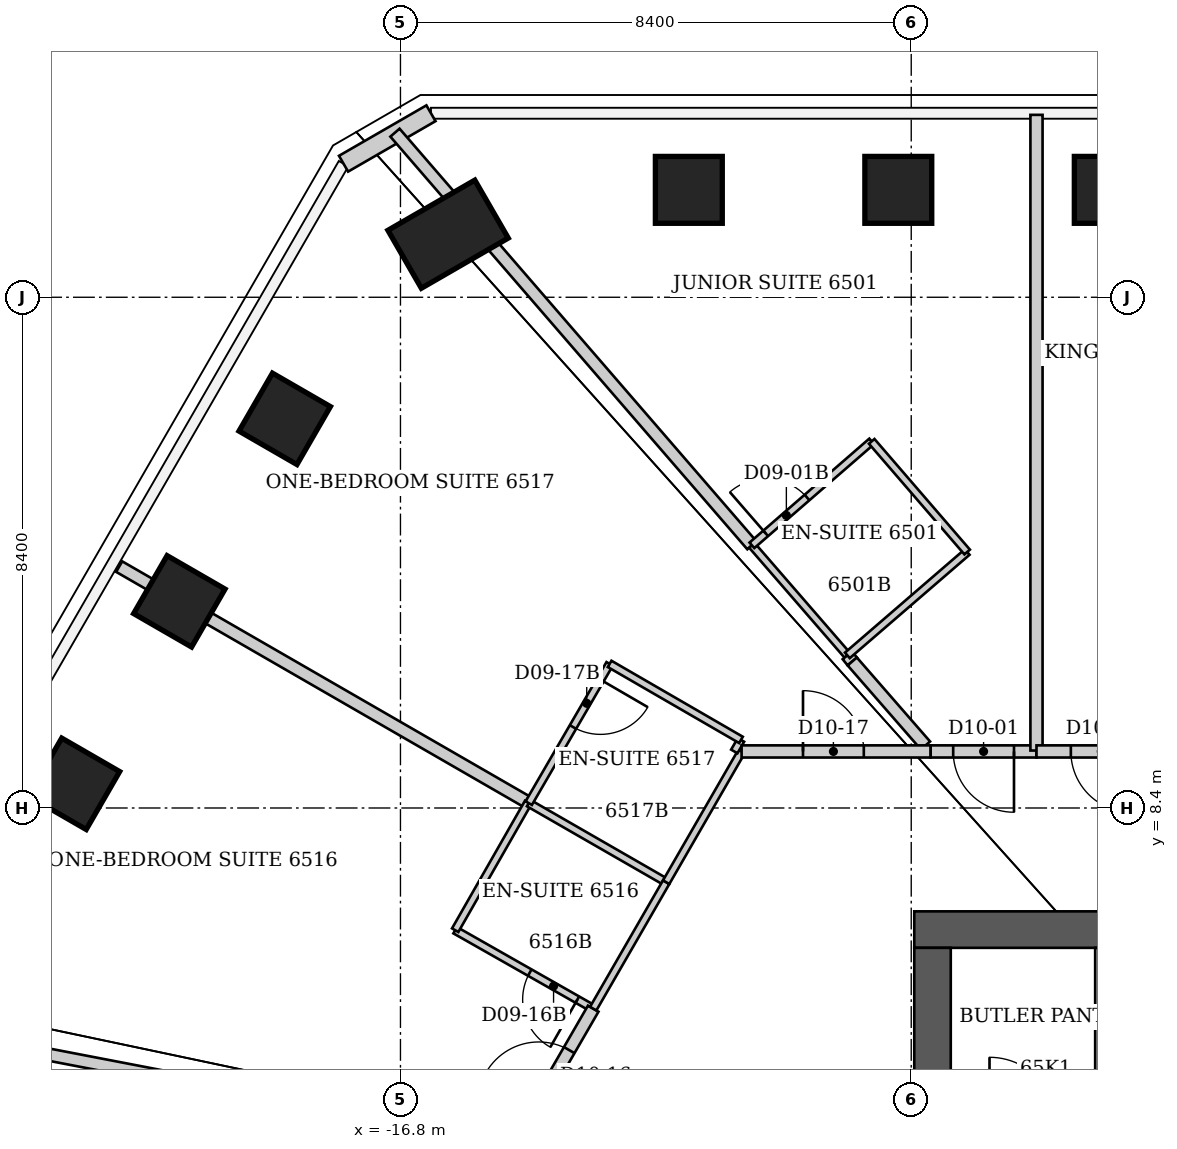
"""IFC4 building model, lengths in metres.
Left out: names, types, materials, properties, quantities, classifications, styles, units other than length and angle.
Written with IfcOpenShell. Run it as: python <this file> out.ifc"""

import sys

from ifc_helpers import new_model, si_unit, direction, frame, frame_2d, origin, origin_2d, place, context, subcontext, project, spatial, rectangle, extrude, element, fill, save


model = new_model("IFC4")
c1 = context("Model", 3, precision=1e-05, world=origin(), true_north=direction((0.0, 1.0)))
c2 = subcontext(c1, "Body", "Model", "MODEL_VIEW")
j1 = project(units=[si_unit("LENGTHUNIT", "METRE"), si_unit("PLANEANGLEUNIT", "RADIAN")], contexts=[c1])
p1 = place(None, origin())
s1 = spatial("IfcSite", under=j1, at=p1, CompositionType="ELEMENT")
p2 = place(p1, origin())
s2 = spatial("IfcBuilding", under=s1, at=p2, CompositionType="ELEMENT")
p3 = place(p2, frame((0.0, 0.0, 260.8)))
s3 = spatial("IfcBuildingStorey", under=s2, at=p3, CompositionType="ELEMENT", Elevation=260.8)
for number, where, z_axis, x_axis in (
    (1, (-12.058, 18.566, 0.0), (0.0, 0.0, 1.0), (0.0, 1.0, 0.0)),
    (2, (-8.613, 18.566, 0.0), (0.0, 0.0, 1.0), (0.0, 1.0, 0.0)),
    (3, (-5.167, 18.566, 0.0), (0.0, 0.0, 1.0), (0.0, 1.0, 0.0)),
    (4, (-22.169, 8.798, 0.0), (0.0, 0.0, 1.0), (-0.866, 0.5, 0.0)),
    (5, (-20.437, 11.799, 0.0), (0.0, 0.0, 1.0), (-0.866, 0.5, 0.0)),
    (6, (-18.704, 14.8, 0.0), (0.0, 0.0, 1.0), (-0.866, 0.5, 0.0)),
):
    element("IfcColumn", number, at=place(p3, frame(where, z_axis=z_axis, x_axis=x_axis)), inside=s3, PredefinedType="COLUMN", context=c2, shape_type="SweptSolid", body=[
        extrude(rectangle(XDim=1.1, YDim=1.1, at=origin_2d()), origin(), (0.0, 0.0, 1.0), 3.8),
    ])
p4 = place(p3, frame((-16.017, 17.837, 0.0), z_axis=(0.0, 0.0, 1.0), x_axis=(-0.5, 0.866025403784, 0.0)))
e7 = element("IfcColumn", 7, at=p4, inside=s3, PredefinedType="COLUMN", context=c2, shape_type="SweptSolid", body=[
    extrude(rectangle(XDim=1.1, YDim=1.65, at=origin_2d()), origin(), (0.0, 0.0, 1.0), 3.8),
])
p5 = place(p3, frame((-8.35, 6.4, 0.0), z_axis=(0.0, 0.0, 1.0), x_axis=(1.0, 0.0, 0.0)))
e8 = element("IfcWall", 8, at=p5, inside=s3, PredefinedType="SHEAR", context=c2, shape_type="SweptSolid", body=[
    extrude(rectangle(XDim=16.7, YDim=0.6, at=frame_2d((8.35, 0.0))), origin(), (0.0, 0.0, 1.0), 3.8),
])
p6 = place(p5, frame((6.488, 0.0, 0.0)))
e9 = element("IfcOpeningElement", 9, at=p6, cuts=e8, PredefinedType="OPENING", context=c2, shape_type="SweptSolid", body=[
    extrude(rectangle(XDim=1.1, YDim=2.1, at=frame_2d((0.55, 1.05))), frame((0.0, 0.3, 0.0), z_axis=(0.0, -1.0, 0.0), x_axis=(1.0, 0.0, 0.0)), (0.0, 0.0, 1.0), 0.6),
])
p7 = place(p5, frame((9.113, 0.0, 0.0)))
e10 = element("IfcOpeningElement", 10, at=p7, cuts=e8, PredefinedType="OPENING", context=c2, shape_type="SweptSolid", body=[
    extrude(rectangle(XDim=1.1, YDim=2.1, at=frame_2d((0.55, 1.05))), frame((0.0, 0.3, 0.0), z_axis=(0.0, -1.0, 0.0), x_axis=(1.0, 0.0, 0.0)), (0.0, 0.0, 1.0), 0.6),
])
p8 = place(p5, frame((11.738, 0.0, 0.0)))
e11 = element("IfcOpeningElement", 11, at=p8, cuts=e8, PredefinedType="OPENING", context=c2, shape_type="SweptSolid", body=[
    extrude(rectangle(XDim=1.1, YDim=2.1, at=frame_2d((0.55, 1.05))), frame((0.0, 0.3, 0.0), z_axis=(0.0, -1.0, 0.0), x_axis=(1.0, 0.0, 0.0)), (0.0, 0.0, 1.0), 0.6),
])
p9 = place(p5, frame((14.363, 0.0, 0.0)))
e12 = element("IfcOpeningElement", 12, at=p9, cuts=e8, PredefinedType="OPENING", context=c2, shape_type="SweptSolid", body=[
    extrude(rectangle(XDim=1.1, YDim=2.1, at=frame_2d((0.55, 1.05))), frame((0.0, 0.3, 0.0), z_axis=(0.0, -1.0, 0.0), x_axis=(1.0, 0.0, 0.0)), (0.0, 0.0, 1.0), 0.6),
])
p10 = place(p3, frame((-8.05, -6.1, 0.0), z_axis=(0.0, 0.0, 1.0), x_axis=(0.0, 1.0, 0.0)))
e13 = element("IfcWall", 13, at=p10, inside=s3, PredefinedType="SHEAR", context=c2, shape_type="SweptSolid", body=[
    extrude(rectangle(XDim=12.2, YDim=0.6, at=frame_2d((6.1, 0.0))), origin(), (0.0, 0.0, 1.0), 3.8),
])
p11 = place(p10, frame((7.6, 0.0, 0.0)))
e14 = element("IfcOpeningElement", 14, at=p11, cuts=e13, PredefinedType="OPENING", context=c2, shape_type="SweptSolid", body=[
    extrude(rectangle(XDim=1.2, YDim=2.2, at=frame_2d((0.6, 1.1))), frame((0.0, 0.3, 0.0), z_axis=(0.0, -1.0, 0.0), x_axis=(1.0, 0.0, 0.0)), (0.0, 0.0, 1.0), 0.6),
])
p12 = place(p3, frame((-5.25, 3.35, 0.0), z_axis=(0.0, 0.0, 1.0), x_axis=(0.0, 1.0, 0.0)))
e15 = element("IfcWall", 15, at=p12, inside=s3, PredefinedType="PARTITIONING", context=c2, shape_type="SweptSolid", body=[
    extrude(rectangle(XDim=2.75, YDim=0.25, at=frame_2d((1.375, 0.0))), origin(), (0.0, 0.0, 1.0), 3.8),
])
p13 = place(p3, frame((-17.736, 18.996, 0.0), z_axis=(0.0, 0.0, 1.0), x_axis=(0.866026405774, 0.499998264499, 0.0)))
e16 = element("IfcWall", 16, at=p13, inside=s3, PredefinedType="SOLIDWALL", context=c2, shape_type="SweptSolid", body=[
    extrude(rectangle(XDim=1.66, YDim=0.3, at=frame_2d((0.83, 0.0))), origin(), (0.0, 0.0, 1.0), 3.64),
])
p14 = place(p3, frame((-25.341, 4.874, 0.0), z_axis=(0.0, 0.0, 1.0), x_axis=(0.982001168061, -0.188874841966, 0.0)))
e17 = element("IfcWall", 17, at=p14, inside=s3, PredefinedType="PARTITIONING", context=c2, shape_type="SweptSolid", body=[
    extrude(rectangle(XDim=10.557, YDim=0.2, at=frame_2d((5.278, 0.0))), origin(), (0.0, 0.0, 1.0), 3.64),
])
p15 = place(p3, frame((-21.426, 12.37, 0.0), z_axis=(0.0, 0.0, 1.0), x_axis=(0.866202335538, -0.499693419917, 0.0)))
e18 = element("IfcWall", 18, at=p15, inside=s3, PredefinedType="PARTITIONING", context=c2, shape_type="SweptSolid", body=[
    extrude(rectangle(XDim=7.765, YDim=0.2, at=frame_2d((3.883, 0.0))), origin(), (0.0, 0.0, 1.0), 2.878),
])
p16 = place(p3, frame((-16.89, 19.507, 0.0), z_axis=(0.0, 0.0, 1.0), x_axis=(0.65416581431, -0.756351166713, 0.0)))
e19 = element("IfcWall", 19, at=p16, inside=s3, PredefinedType="PARTITIONING", context=c2, shape_type="SweptSolid", body=[
    extrude(rectangle(XDim=8.974, YDim=0.2, at=frame_2d((4.487, 0.0))), origin(), (0.0, 0.0, 1.0), 3.64),
])
p17 = place(p3, frame((-15.9, 6.39, 0.0), z_axis=(0.0, 0.0, 1.0), x_axis=(0.869431908012, -0.494052787999, 0.0)))
e20 = element("IfcWall", 20, at=p17, inside=s3, PredefinedType="PARTITIONING", context=c2, shape_type="SweptSolid", body=[
    extrude(rectangle(XDim=2.611, YDim=0.12, at=frame_2d((1.305, 0.0))), origin(), (0.0, 0.0, 1.0), 3.64),
])
p18 = place(p17, frame((1.411, 0.0, 0.0)))
e21 = element("IfcOpeningElement", 21, at=p18, cuts=e20, PredefinedType="OPENING", context=c2, shape_type="SweptSolid", body=[
    extrude(rectangle(XDim=0.9, YDim=2.03, at=frame_2d((0.45, 1.015))), frame((0.0, 0.06, 0.0), z_axis=(0.0, -1.0, 0.0), x_axis=(1.0, 0.0, 0.0)), (0.0, 0.0, 1.0), 0.12),
])
p19 = place(p3, frame((-14.92, 2.87, 0.0), z_axis=(0.0, 0.0, 1.0), x_axis=(0.500714932888, 0.865612243434, 0.0)))
e22 = element("IfcWall", 22, at=p19, inside=s3, PredefinedType="PARTITIONING", context=c2, shape_type="SweptSolid", body=[
    extrude(rectangle(XDim=2.576, YDim=0.2, at=frame_2d((1.288, 0.0))), origin(), (0.0, 0.0, 1.0), 3.64),
])
p20 = place(p19, frame((0.788, 0.0, 0.0)))
e23 = element("IfcOpeningElement", 23, at=p20, cuts=e22, PredefinedType="OPENING", context=c2, shape_type="SweptSolid", body=[
    extrude(rectangle(XDim=1.0, YDim=2.13, at=frame_2d((0.5, 1.065))), frame((0.0, 0.1, 0.0), z_axis=(0.0, -1.0, 0.0), x_axis=(1.0, 0.0, 0.0)), (0.0, 0.0, 1.0), 0.2),
])
p21 = place(p3, frame((-14.7, 8.49, 0.0), z_axis=(0.0, 0.0, 1.0), x_axis=(-0.496106327528, -0.868261776072, 0.0)))
e24 = element("IfcWall", 24, at=p21, inside=s3, PredefinedType="PARTITIONING", context=c2, shape_type="SweptSolid", body=[
    extrude(rectangle(XDim=2.419, YDim=0.12, at=frame_2d((1.209, 0.0))), origin(), (0.0, 0.0, 1.0), 3.64),
])
p22 = place(p3, frame((-14.69, 8.48, 0.0), z_axis=(0.0, 0.0, 1.0), x_axis=(0.866816256489, -0.498627694264, 0.0)))
e25 = element("IfcWall", 25, at=p22, inside=s3, PredefinedType="PARTITIONING", context=c2, shape_type="SweptSolid", body=[
    extrude(rectangle(XDim=2.607, YDim=0.12, at=frame_2d((1.304, 0.0))), origin(), (0.0, 0.0, 1.0), 2.878),
])
p23 = place(p3, frame((-13.63, 5.1, 0.0), z_axis=(0.0, 0.0, 1.0), x_axis=(0.499737123639, 0.866177122335, 0.0)))
e26 = element("IfcWall", 26, at=p23, inside=s3, PredefinedType="PARTITIONING", context=c2, shape_type="SweptSolid", body=[
    extrude(rectangle(XDim=2.401, YDim=0.12, at=frame_2d((1.201, 0.0))), origin(), (0.0, 0.0, 1.0), 3.64),
])
p24 = place(p3, frame((-13.36, 10.77, 0.0), z_axis=(0.0, 0.0, 1.0), x_axis=(-0.502173326652, -0.864766991738, 0.0)))
e27 = element("IfcWall", 27, at=p24, inside=s3, PredefinedType="PARTITIONING", context=c2, shape_type="SweptSolid", body=[
    extrude(rectangle(XDim=2.648, YDim=0.12, at=frame_2d((1.324, 0.0))), origin(), (0.0, 0.0, 1.0), 3.64),
])
p25 = place(p24, frame((0.3, 0.0, 0.0)))
e28 = element("IfcOpeningElement", 28, at=p25, cuts=e27, PredefinedType="OPENING", context=c2, shape_type="SweptSolid", body=[
    extrude(rectangle(XDim=0.9, YDim=2.03, at=frame_2d((0.45, 1.015))), frame((0.0, 0.06, 0.0), z_axis=(0.0, -1.0, 0.0), x_axis=(1.0, 0.0, 0.0)), (0.0, 0.0, 1.0), 0.12),
])
p26 = place(p3, frame((-12.43, 7.18, 0.0), z_axis=(0.0, 0.0, 1.0), x_axis=(0.499577688184, 0.866269088372, 0.0)))
e29 = element("IfcWall", 29, at=p26, inside=s3, PredefinedType="PARTITIONING", context=c2, shape_type="SweptSolid", body=[
    extrude(rectangle(XDim=2.482, YDim=0.12, at=frame_2d((1.241, 0.0))), origin(), (0.0, 0.0, 1.0), 3.64),
])
p27 = place(p3, frame((-11.31, 9.33, 0.0), z_axis=(0.0, 0.0, 1.0), x_axis=(0.501518373175, 0.865146994081, 0.0)))
e30 = element("IfcWall", 30, at=p27, inside=s3, PredefinedType="PARTITIONING", context=c2, shape_type="SweptSolid", body=[
    extrude(rectangle(XDim=0.219, YDim=0.12, at=frame_2d((0.11, 0.0))), origin(), (0.0, 0.0, 1.0), 3.64),
])
p28 = place(p3, frame((-11.2, 9.52, 0.0), z_axis=(0.0, 0.0, 1.0), x_axis=(-0.865533423938, 0.500851167559, 0.0)))
e31 = element("IfcWall", 31, at=p28, inside=s3, PredefinedType="PARTITIONING", context=c2, shape_type="SweptSolid", body=[
    extrude(rectangle(XDim=2.496, YDim=0.12, at=frame_2d((1.248, 0.0))), origin(), (0.0, 0.0, 1.0), 3.64),
])
p29 = place(p3, frame((-11.02, 12.72, 0.0), z_axis=(0.0, 0.0, 1.0), x_axis=(0.655252439976, -0.755409981338, 0.0)))
e32 = element("IfcWall", 32, at=p29, inside=s3, PredefinedType="PARTITIONING", context=c2, shape_type="SweptSolid", body=[
    extrude(rectangle(XDim=2.396, YDim=0.12, at=frame_2d((1.198, 0.0))), origin(), (0.0, 0.0, 1.0), 3.64),
])
p30 = place(p3, frame((-9.45, 10.91, 0.0), z_axis=(0.0, 0.0, 1.0), x_axis=(0.625625039906, -0.780123906468, 0.0)))
e33 = element("IfcWall", 33, at=p30, inside=s3, PredefinedType="PARTITIONING", context=c2, shape_type="SweptSolid", body=[
    extrude(rectangle(XDim=0.128, YDim=0.2, at=frame_2d((0.064, 0.0))), origin(), (0.0, 0.0, 1.0), 3.64),
])
p31 = place(p3, frame((-9.45, 10.91, 0.0), z_axis=(0.0, 0.0, 1.0), x_axis=(0.757040252764, 0.65336823897, 0.0)))
e34 = element("IfcWall", 34, at=p31, inside=s3, PredefinedType="PARTITIONING", context=c2, shape_type="SweptSolid", body=[
    extrude(rectangle(XDim=2.602, YDim=0.12, at=frame_2d((1.301, 0.0))), origin(), (0.0, 0.0, 1.0), 3.64),
])
p32 = place(p3, frame((-9.37, 10.81, 0.0), z_axis=(0.0, 0.0, 1.0), x_axis=(0.657042073586, -0.753853907291, 0.0)))
e35 = element("IfcWall", 35, at=p32, inside=s3, PredefinedType="PARTITIONING", context=c2, shape_type="SweptSolid", body=[
    extrude(rectangle(XDim=1.833, YDim=0.2, at=frame_2d((0.917, 0.0))), origin(), (0.0, 0.0, 1.0), 3.64),
])
p33 = place(p3, frame((-9.05, 14.43, 0.0), z_axis=(0.0, 0.0, 1.0), x_axis=(-0.755185511235, -0.655511131576, 0.0)))
e36 = element("IfcWall", 36, at=p33, inside=s3, PredefinedType="PARTITIONING", context=c2, shape_type="SweptSolid", body=[
    extrude(rectangle(XDim=2.609, YDim=0.12, at=frame_2d((1.304, 0.0))), origin(), (0.0, 0.0, 1.0), 3.64),
])
p34 = place(p33, frame((1.409, 0.0, 0.0)))
e37 = element("IfcOpeningElement", 37, at=p34, cuts=e36, PredefinedType="OPENING", context=c2, shape_type="SweptSolid", body=[
    extrude(rectangle(XDim=0.9, YDim=2.03, at=frame_2d((0.45, 1.015))), frame((0.0, 0.06, 0.0), z_axis=(0.0, -1.0, 0.0), x_axis=(1.0, 0.0, 0.0)), (0.0, 0.0, 1.0), 0.12),
])
p35 = place(p3, frame((-8.08, 9.33, 0.0), z_axis=(0.0, 0.0, 1.0), x_axis=(-1.0, 0.0, 0.0)))
e38 = element("IfcWall", 38, at=p35, inside=s3, PredefinedType="PARTITIONING", context=c2, shape_type="SweptSolid", body=[
    extrude(rectangle(XDim=3.11, YDim=0.2, at=frame_2d((1.555, 0.0))), origin(), (0.0, 0.0, 1.0), 3.64),
])
p36 = place(p35, frame((1.1, 0.0, 0.0)))
e39 = element("IfcOpeningElement", 39, at=p36, cuts=e38, PredefinedType="OPENING", context=c2, shape_type="SweptSolid", body=[
    extrude(rectangle(XDim=1.0, YDim=2.13, at=frame_2d((0.5, 1.065))), frame((0.0, 0.1, 0.0), z_axis=(0.0, -1.0, 0.0), x_axis=(1.0, 0.0, 0.0)), (0.0, 0.0, 1.0), 0.2),
])
p37 = place(p3, frame((-7.48, 12.61, 0.0), z_axis=(0.0, 0.0, 1.0), x_axis=(-0.653238965593, 0.75715180369, 0.0)))
e40 = element("IfcWall", 40, at=p37, inside=s3, PredefinedType="PARTITIONING", context=c2, shape_type="SweptSolid", body=[
    extrude(rectangle(XDim=2.404, YDim=0.12, at=frame_2d((1.202, 0.0))), origin(), (0.0, 0.0, 1.0), 3.64),
])
p38 = place(p3, frame((-6.34, 9.33, 0.0), z_axis=(0.0, 0.0, 1.0), x_axis=(-1.0, 0.0, 0.0)))
e41 = element("IfcWall", 41, at=p38, inside=s3, PredefinedType="PARTITIONING", context=c2, shape_type="SweptSolid", body=[
    extrude(rectangle(XDim=1.74, YDim=0.2, at=frame_2d((0.87, 0.0))), origin(), (0.0, 0.0, 1.0), 3.64),
])
p39 = place(p38, frame((0.37, 0.0, 0.0)))
e42 = element("IfcOpeningElement", 42, at=p39, cuts=e41, PredefinedType="OPENING", context=c2, shape_type="SweptSolid", body=[
    extrude(rectangle(XDim=1.0, YDim=2.13, at=frame_2d((0.5, 1.065))), frame((0.0, 0.1, 0.0), z_axis=(0.0, -1.0, 0.0), x_axis=(1.0, 0.0, 0.0)), (0.0, 0.0, 1.0), 0.2),
])
p40 = place(p3, frame((-6.34, 19.8, 0.0), z_axis=(0.0, 0.0, 1.0), x_axis=(0.0, -1.0, 0.0)))
e43 = element("IfcWall", 43, at=p40, inside=s3, PredefinedType="PARTITIONING", context=c2, shape_type="SweptSolid", body=[
    extrude(rectangle(XDim=10.455, YDim=0.2, at=frame_2d((5.228, 0.0))), origin(), (0.0, 0.0, 1.0), 3.64),
])
p41 = place(p3, frame((-4.21, 9.33, 0.0), z_axis=(0.0, 0.0, 1.0), x_axis=(-1.0, 0.0, 0.0)))
e44 = element("IfcWall", 44, at=p41, inside=s3, PredefinedType="PARTITIONING", context=c2, shape_type="SweptSolid", body=[
    extrude(rectangle(XDim=2.13, YDim=0.2, at=frame_2d((1.065, 0.0))), origin(), (0.0, 0.0, 1.0), 3.64),
])
p42 = place(p41, frame((0.565, 0.0, 0.0)))
e45 = element("IfcOpeningElement", 45, at=p42, cuts=e44, PredefinedType="OPENING", context=c2, shape_type="SweptSolid", body=[
    extrude(rectangle(XDim=1.0, YDim=2.13, at=frame_2d((0.5, 1.065))), frame((0.0, 0.1, 0.0), z_axis=(0.0, -1.0, 0.0), x_axis=(1.0, 0.0, 0.0)), (0.0, 0.0, 1.0), 0.2),
])
p43 = place(p39, origin())
e46 = element("IfcDoor", 46, at=p43, inside=s3, OperationType="SINGLE_SWING_LEFT", PredefinedType="DOOR", context=c2, shape_type="SweptSolid", body=[
    extrude(rectangle(XDim=1.0, YDim=2.13, at=frame_2d((0.5, 1.065))), frame((0.0, 0.025, 0.0), z_axis=(0.0, -1.0, 0.0), x_axis=(1.0, 0.0, 0.0)), (0.0, 0.0, 1.0), 0.05),
])
fill(e42, e46)
p44 = place(p34, origin())
e47 = element("IfcDoor", 47, at=p44, inside=s3, OperationType="SINGLE_SWING_RIGHT", PredefinedType="DOOR", context=c2, shape_type="SweptSolid", body=[
    extrude(rectangle(XDim=0.9, YDim=2.03, at=frame_2d((0.45, 1.015))), frame((0.0, 0.025, 0.0), z_axis=(0.0, -1.0, 0.0), x_axis=(1.0, 0.0, 0.0)), (0.0, 0.0, 1.0), 0.05),
])
fill(e37, e47)
p45 = place(p42, origin())
e48 = element("IfcDoor", 48, at=p45, inside=s3, OperationType="SINGLE_SWING_LEFT", PredefinedType="DOOR", context=c2, shape_type="SweptSolid", body=[
    extrude(rectangle(XDim=1.0, YDim=2.13, at=frame_2d((0.5, 1.065))), frame((0.0, 0.025, 0.0), z_axis=(0.0, -1.0, 0.0), x_axis=(1.0, 0.0, 0.0)), (0.0, 0.0, 1.0), 0.05),
])
fill(e45, e48)
p46 = place(p20, origin())
e49 = element("IfcDoor", 49, at=p46, inside=s3, OperationType="SINGLE_SWING_LEFT", PredefinedType="DOOR", context=c2, shape_type="SweptSolid", body=[
    extrude(rectangle(XDim=1.0, YDim=2.13, at=frame_2d((0.5, 1.065))), frame((0.0, 0.025, 0.0), z_axis=(0.0, -1.0, 0.0), x_axis=(1.0, 0.0, 0.0)), (0.0, 0.0, 1.0), 0.05),
])
fill(e23, e49)
p47 = place(p18, origin())
e50 = element("IfcDoor", 50, at=p47, inside=s3, OperationType="SINGLE_SWING_RIGHT", PredefinedType="DOOR", context=c2, shape_type="SweptSolid", body=[
    extrude(rectangle(XDim=0.9, YDim=2.03, at=frame_2d((0.45, 1.015))), frame((0.0, 0.025, 0.0), z_axis=(0.0, -1.0, 0.0), x_axis=(1.0, 0.0, 0.0)), (0.0, 0.0, 1.0), 0.05),
])
fill(e21, e50)
p48 = place(p36, origin())
e51 = element("IfcDoor", 51, at=p48, inside=s3, OperationType="SINGLE_SWING_RIGHT", PredefinedType="DOOR", context=c2, shape_type="SweptSolid", body=[
    extrude(rectangle(XDim=1.0, YDim=2.13, at=frame_2d((0.5, 1.065))), frame((0.0, 0.025, 0.0), z_axis=(0.0, -1.0, 0.0), x_axis=(1.0, 0.0, 0.0)), (0.0, 0.0, 1.0), 0.05),
])
fill(e39, e51)
p49 = place(p25, origin())
e52 = element("IfcDoor", 52, at=p49, inside=s3, OperationType="SINGLE_SWING_LEFT", PredefinedType="DOOR", context=c2, shape_type="SweptSolid", body=[
    extrude(rectangle(XDim=0.9, YDim=2.03, at=frame_2d((0.45, 1.015))), frame((0.0, 0.025, 0.0), z_axis=(0.0, -1.0, 0.0), x_axis=(1.0, 0.0, 0.0)), (0.0, 0.0, 1.0), 0.05),
])
fill(e28, e52)
save(model, sys.argv[1])
